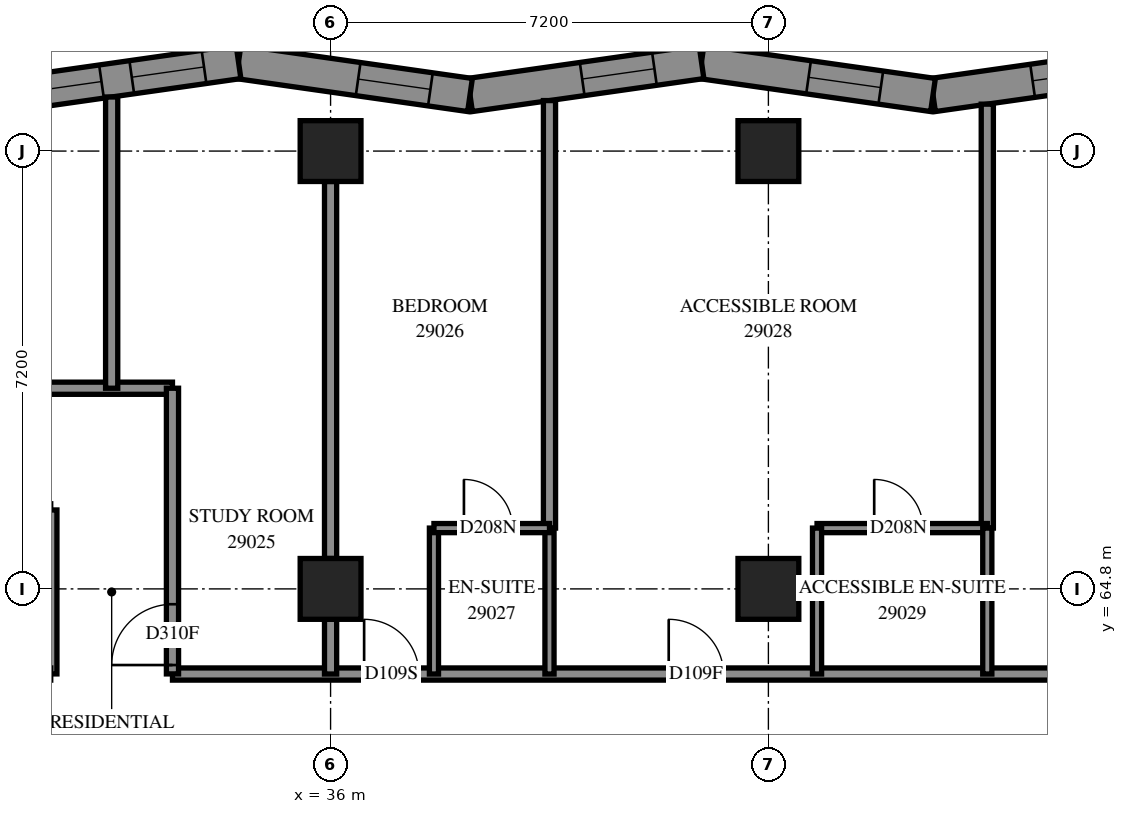
"""IFC4 building model, lengths in metres.
Left out: names, types, materials, properties, quantities, classifications, styles, units other than length and angle.
Written with IfcOpenShell. Run it as: python <this file> out.ifc"""

import sys

from ifc_helpers import new_model, si_unit, direction, frame, frame_2d, origin, origin_2d, place, context, subcontext, project, spatial, polyline, rectangle, outline, extrude, element, fill, save


model = new_model("IFC4")
c1 = context("Model", 3, precision=1e-05, world=origin(), true_north=direction((0.0, 1.0)))
c2 = subcontext(c1, "Body", "Model", "MODEL_VIEW")
j1 = project(units=[si_unit("LENGTHUNIT", "METRE"), si_unit("PLANEANGLEUNIT", "RADIAN")], contexts=[c1])
p1 = place(None, origin())
s1 = spatial("IfcSite", under=j1, at=p1, CompositionType="ELEMENT")
p2 = place(p1, origin())
s2 = spatial("IfcBuilding", under=s1, at=p2, CompositionType="ELEMENT")
p3 = place(p2, frame((0.0, 0.0, 108.4)))
s3 = spatial("IfcBuildingStorey", under=s2, at=p3, CompositionType="ELEMENT", Elevation=108.4)
for number, where, z_axis, x_axis in (
    (1, (36.0, 64.8, 0.0), (0.0, 0.0, 1.0), (1.0, 0.0, 0.0)),
    (2, (36.0, 72.0, 0.0), (0.0, 0.0, 1.0), (1.0, 0.0, 0.0)),
    (3, (43.2, 64.8, 0.0), (0.0, 0.0, 1.0), (1.0, 0.0, 0.0)),
    (4, (43.2, 72.0, 0.0), (0.0, 0.0, 1.0), (1.0, 0.0, 0.0)),
):
    element("IfcColumn", number, at=place(p3, frame(where, z_axis=z_axis, x_axis=x_axis)), inside=s3, PredefinedType="COLUMN", context=c2, shape_type="SweptSolid", body=[
        extrude(rectangle(XDim=1.0, YDim=1.0, at=origin_2d()), origin(), (0.0, 0.0, 1.0), 3.1),
    ])
p4 = place(p3, frame((49.714, 73.464, 0.0), z_axis=(0.0, 0.0, 1.0), x_axis=(-0.990016994, -0.1409480459, 0.0)))
e5 = element("IfcWall", 5, at=p4, inside=s3, PredefinedType="SOLIDWALL", context=c2, shape_type="SweptSolid", body=[
    extrude(outline(polyline([(-0.039, -0.275), (3.806, -0.275), (3.885, 0.275), (0.039, 0.275), (-0.039, -0.275)])), origin(), (0.0, 0.0, 1.0), 3.1),
])
p5 = place(p4, frame((0.991, 0.0, 0.5)))
e6 = element("IfcOpeningElement", 6, at=p5, cuts=e5, PredefinedType="OPENING", context=c2, shape_type="SweptSolid", body=[
    extrude(rectangle(XDim=1.2, YDim=2.45, at=frame_2d((0.6, 1.225))), frame((0.0, 0.285, 0.0), z_axis=(0.0, -1.0, 0.0), x_axis=(1.0, 0.0, 0.0)), (0.0, 0.0, 1.0), 0.57),
])
p6 = place(p3, frame((45.907, 72.922, 0.0), z_axis=(0.0, 0.0, 1.0), x_axis=(-0.9900175106, 0.1409444172, 0.0)))
e7 = element("IfcWall", 7, at=p6, inside=s3, PredefinedType="SOLIDWALL", context=c2, shape_type="SweptSolid", body=[
    extrude(outline(polyline([(0.039, -0.275), (3.885, -0.275), (3.806, 0.275), (-0.039, 0.275), (0.039, -0.275)])), origin(), (0.0, 0.0, 1.0), 3.1),
])
p7 = place(p6, frame((0.867, 0.0, 0.5)))
e8 = element("IfcOpeningElement", 8, at=p7, cuts=e7, PredefinedType="OPENING", context=c2, shape_type="SweptSolid", body=[
    extrude(rectangle(XDim=1.2, YDim=2.45, at=frame_2d((0.6, 1.225))), frame((0.0, 0.285, 0.0), z_axis=(0.0, -1.0, 0.0), x_axis=(1.0, 0.0, 0.0)), (0.0, 0.0, 1.0), 0.57),
])
p8 = place(p3, frame((42.1, 73.464, 0.0), z_axis=(0.0, 0.0, 1.0), x_axis=(-0.990016994, -0.1409480459, 0.0)))
e9 = element("IfcWall", 9, at=p8, inside=s3, PredefinedType="SOLIDWALL", context=c2, shape_type="SweptSolid", body=[
    extrude(outline(polyline([(-0.039, -0.275), (3.806, -0.275), (3.885, 0.275), (0.039, 0.275), (-0.039, -0.275)])), origin(), (0.0, 0.0, 1.0), 3.1),
])
p9 = place(p8, frame((0.782, 0.0, 0.5)))
e10 = element("IfcOpeningElement", 10, at=p9, cuts=e9, PredefinedType="OPENING", context=c2, shape_type="SweptSolid", body=[
    extrude(rectangle(XDim=1.2, YDim=2.45, at=frame_2d((0.6, 1.225))), frame((0.0, 0.285, 0.0), z_axis=(0.0, -1.0, 0.0), x_axis=(1.0, 0.0, 0.0)), (0.0, 0.0, 1.0), 0.57),
])
p10 = place(p3, frame((38.293, 72.922, 0.0), z_axis=(0.0, 0.0, 1.0), x_axis=(-0.990016994, 0.1409480459, 0.0)))
e11 = element("IfcWall", 11, at=p10, inside=s3, PredefinedType="SOLIDWALL", context=c2, shape_type="SweptSolid", body=[
    extrude(outline(polyline([(0.039, -0.275), (3.885, -0.275), (3.806, 0.275), (-0.039, 0.275), (0.039, -0.275)])), origin(), (0.0, 0.0, 1.0), 3.1),
])
p11 = place(p10, frame((0.658, 0.0, 0.5)))
e12 = element("IfcOpeningElement", 12, at=p11, cuts=e11, PredefinedType="OPENING", context=c2, shape_type="SweptSolid", body=[
    extrude(rectangle(XDim=1.2, YDim=2.45, at=frame_2d((0.6, 1.225))), frame((0.0, 0.285, 0.0), z_axis=(0.0, -1.0, 0.0), x_axis=(1.0, 0.0, 0.0)), (0.0, 0.0, 1.0), 0.57),
])
p12 = place(p3, frame((34.486, 73.464, 0.0), z_axis=(0.0, 0.0, 1.0), x_axis=(-0.990016994, -0.1409480459, 0.0)))
e13 = element("IfcWall", 13, at=p12, inside=s3, PredefinedType="SOLIDWALL", context=c2, shape_type="SweptSolid", body=[
    extrude(outline(polyline([(-0.039, -0.275), (3.806, -0.275), (3.885, 0.275), (0.039, 0.275), (-0.039, -0.275)])), origin(), (0.0, 0.0, 1.0), 3.1),
])
p13 = place(p12, frame((0.573, 0.0, 0.5)))
e14 = element("IfcOpeningElement", 14, at=p13, cuts=e13, PredefinedType="OPENING", context=c2, shape_type="SweptSolid", body=[
    extrude(rectangle(XDim=1.2, YDim=2.45, at=frame_2d((0.6, 1.225))), frame((0.0, 0.285, 0.0), z_axis=(0.0, -1.0, 0.0), x_axis=(1.0, 0.0, 0.0)), (0.0, 0.0, 1.0), 0.57),
])
p14 = place(p12, frame((2.276, 0.0, 0.5)))
e15 = element("IfcOpeningElement", 15, at=p14, cuts=e13, PredefinedType="OPENING", context=c2, shape_type="SweptSolid", body=[
    extrude(rectangle(XDim=1.2, YDim=2.45, at=frame_2d((0.6, 1.225))), frame((0.0, 0.285, 0.0), z_axis=(0.0, -1.0, 0.0), x_axis=(1.0, 0.0, 0.0)), (0.0, 0.0, 1.0), 0.57),
])
p15 = place(p3, frame((33.4, 63.4, 0.0), z_axis=(0.0, 0.0, 1.0), x_axis=(1.0, 0.0, 0.0)))
e16 = element("IfcWall", 16, at=p15, inside=s3, PredefinedType="PARTITIONING", context=c2, shape_type="SweptSolid", body=[
    extrude(rectangle(XDim=21.9, YDim=0.2, at=frame_2d((10.95, 0.0))), origin(), (0.0, 0.0, 1.0), 3.1),
])
p16 = place(p15, frame((3.152, 0.0, 0.0)))
e17 = element("IfcOpeningElement", 17, at=p16, cuts=e16, PredefinedType="OPENING", context=c2, shape_type="SweptSolid", body=[
    extrude(rectangle(XDim=0.9, YDim=2.1, at=frame_2d((0.45, 1.05))), frame((0.0, 0.11, 0.0), z_axis=(0.0, -1.0, 0.0), x_axis=(1.0, 0.0, 0.0)), (0.0, 0.0, 1.0), 0.22),
])
p17 = place(p15, frame((8.161, 0.0, 0.0)))
e18 = element("IfcOpeningElement", 18, at=p17, cuts=e16, PredefinedType="OPENING", context=c2, shape_type="SweptSolid", body=[
    extrude(rectangle(XDim=0.9, YDim=2.1, at=frame_2d((0.45, 1.05))), frame((0.0, 0.11, 0.0), z_axis=(0.0, -1.0, 0.0), x_axis=(1.0, 0.0, 0.0)), (0.0, 0.0, 1.0), 0.22),
])
p18 = place(p15, frame((15.471, 0.0, 0.0)))
e19 = element("IfcOpeningElement", 19, at=p18, cuts=e16, PredefinedType="OPENING", context=c2, shape_type="SweptSolid", body=[
    extrude(rectangle(XDim=1.0, YDim=2.1, at=frame_2d((0.5, 1.05))), frame((0.0, 0.11, 0.0), z_axis=(0.0, -1.0, 0.0), x_axis=(1.0, 0.0, 0.0)), (0.0, 0.0, 1.0), 0.22),
])
p19 = place(p3, frame((21.602, 68.1, 0.0), z_axis=(0.0, 0.0, 1.0), x_axis=(1.0, 0.0, 0.0)))
e20 = element("IfcWall", 20, at=p19, inside=s3, PredefinedType="PARTITIONING", context=c2, shape_type="SweptSolid", body=[
    extrude(rectangle(XDim=11.798, YDim=0.2, at=frame_2d((5.899, 0.0))), origin(), (0.0, 0.0, 1.0), 3.1),
])
p20 = place(p19, frame((5.972, 0.0, 0.0)))
e21 = element("IfcOpeningElement", 21, at=p20, cuts=e20, PredefinedType="OPENING", context=c2, shape_type="SweptSolid", body=[
    extrude(rectangle(XDim=1.0, YDim=2.1, at=frame_2d((0.5, 1.05))), frame((0.0, 0.11, 0.0), z_axis=(0.0, -1.0, 0.0), x_axis=(1.0, 0.0, 0.0)), (0.0, 0.0, 1.0), 0.22),
])
p21 = place(p3, frame((39.6, 65.8, 0.0), z_axis=(0.0, 0.0, 1.0), x_axis=(0.0, 1.0, 0.0)))
e22 = element("IfcWall", 22, at=p21, inside=s3, PredefinedType="PARTITIONING", context=c2, shape_type="SweptSolid", body=[
    extrude(rectangle(XDim=7.03, YDim=0.2, at=frame_2d((3.515, 0.0))), origin(), (0.0, 0.0, 1.0), 3.1),
])
p22 = place(p3, frame((46.8, 65.8, 0.0), z_axis=(0.0, 0.0, 1.0), x_axis=(0.0, 1.0, 0.0)))
e23 = element("IfcWall", 23, at=p22, inside=s3, PredefinedType="PARTITIONING", context=c2, shape_type="SweptSolid", body=[
    extrude(rectangle(XDim=6.972, YDim=0.2, at=frame_2d((3.486, 0.0))), origin(), (0.0, 0.0, 1.0), 3.1),
])
p23 = place(p3, frame((36.0, 65.3, 0.0), z_axis=(0.0, 0.0, 1.0), x_axis=(0.0, 1.0, 0.0)))
e24 = element("IfcWall", 24, at=p23, inside=s3, PredefinedType="PARTITIONING", context=c2, shape_type="SweptSolid", body=[
    extrude(rectangle(XDim=6.2, YDim=0.2, at=frame_2d((3.1, 0.0))), origin(), (0.0, 0.0, 1.0), 3.1),
])
p24 = place(p3, frame((32.4, 68.1, 0.0), z_axis=(0.0, 0.0, 1.0), x_axis=(0.0, 1.0, 0.0)))
e25 = element("IfcWall", 25, at=p24, inside=s3, PredefinedType="PARTITIONING", context=c2, shape_type="SweptSolid", body=[
    extrude(rectangle(XDim=4.79, YDim=0.2, at=frame_2d((2.395, 0.0))), origin(), (0.0, 0.0, 1.0), 3.1),
])
p25 = place(p3, frame((33.4, 63.402, 0.0), z_axis=(0.0, 0.0, 1.0), x_axis=(0.0, 1.0, 0.0)))
e26 = element("IfcWall", 26, at=p25, inside=s3, PredefinedType="PARTITIONING", context=c2, shape_type="SweptSolid", body=[
    extrude(rectangle(XDim=4.698, YDim=0.2, at=frame_2d((2.349, 0.0))), origin(), (0.0, 0.0, 1.0), 3.1),
])
p26 = place(p25, frame((0.146, 0.0, 0.0)))
e27 = element("IfcOpeningElement", 27, at=p26, cuts=e26, PredefinedType="OPENING", context=c2, shape_type="SweptSolid", body=[
    extrude(rectangle(XDim=1.0, YDim=2.1, at=frame_2d((0.5, 1.05))), frame((0.0, 0.11, 0.0), z_axis=(0.0, -1.0, 0.0), x_axis=(1.0, 0.0, 0.0)), (0.0, 0.0, 1.0), 0.22),
])
p27 = place(p3, frame((44.0, 65.8, 0.0), z_axis=(0.0, 0.0, 1.0), x_axis=(1.0, 0.0, 0.0)))
e28 = element("IfcWall", 28, at=p27, inside=s3, PredefinedType="PARTITIONING", context=c2, shape_type="SweptSolid", body=[
    extrude(rectangle(XDim=2.8, YDim=0.15, at=frame_2d((1.4, 0.0))), origin(), (0.0, 0.0, 1.0), 3.1),
])
p28 = place(p27, frame((0.94, 0.0, 0.0)))
e29 = element("IfcOpeningElement", 29, at=p28, cuts=e28, PredefinedType="OPENING", context=c2, shape_type="SweptSolid", body=[
    extrude(rectangle(XDim=0.8, YDim=2.1, at=frame_2d((0.4, 1.05))), frame((0.0, 0.085, 0.0), z_axis=(0.0, -1.0, 0.0), x_axis=(1.0, 0.0, 0.0)), (0.0, 0.0, 1.0), 0.17),
])
p29 = place(p3, frame((31.4, 63.402, 0.0), z_axis=(0.0, 0.0, 1.0), x_axis=(0.0, 1.0, 0.0)))
e30 = element("IfcWall", 30, at=p29, inside=s3, PredefinedType="PARTITIONING", context=c2, shape_type="SweptSolid", body=[
    extrude(rectangle(XDim=2.696, YDim=0.2, at=frame_2d((1.348, 0.0))), origin(), (0.0, 0.0, 1.0), 3.1),
])
for number, where, z_axis, x_axis in (
    (31, (37.7, 63.4, 0.0), (0.0, 0.0, 1.0), (0.0, 1.0, 0.0)),
    (32, (39.6, 63.4, 0.0), (0.0, 0.0, 1.0), (0.0, 1.0, 0.0)),
    (33, (44.0, 63.4, 0.0), (0.0, 0.0, 1.0), (0.0, 1.0, 0.0)),
    (34, (46.8, 63.4, 0.0), (0.0, 0.0, 1.0), (0.0, 1.0, 0.0)),
):
    element("IfcWall", number, at=place(p3, frame(where, z_axis=z_axis, x_axis=x_axis)), inside=s3, PredefinedType="PARTITIONING", context=c2, shape_type="SweptSolid", body=[
        extrude(rectangle(XDim=2.4, YDim=0.15, at=frame_2d((1.2, 0.0))), origin(), (0.0, 0.0, 1.0), 3.1),
    ])
p30 = place(p3, frame((37.7, 65.8, 0.0), z_axis=(0.0, 0.0, 1.0), x_axis=(1.0, 0.0, 0.0)))
e35 = element("IfcWall", 35, at=p30, inside=s3, PredefinedType="PARTITIONING", context=c2, shape_type="SweptSolid", body=[
    extrude(rectangle(XDim=1.9, YDim=0.15, at=frame_2d((0.95, 0.0))), origin(), (0.0, 0.0, 1.0), 3.1),
])
p31 = place(p30, frame((0.493, 0.0, 0.0)))
e36 = element("IfcOpeningElement", 36, at=p31, cuts=e35, PredefinedType="OPENING", context=c2, shape_type="SweptSolid", body=[
    extrude(rectangle(XDim=0.8, YDim=2.1, at=frame_2d((0.4, 1.05))), frame((0.0, 0.085, 0.0), z_axis=(0.0, -1.0, 0.0), x_axis=(1.0, 0.0, 0.0)), (0.0, 0.0, 1.0), 0.17),
])
p32 = place(p3, frame((36.0, 63.4, 0.0), z_axis=(0.0, 0.0, 1.0), x_axis=(0.0, 1.0, 0.0)))
e37 = element("IfcWall", 37, at=p32, inside=s3, PredefinedType="PARTITIONING", context=c2, shape_type="SweptSolid", body=[
    extrude(rectangle(XDim=0.9, YDim=0.2, at=frame_2d((0.45, 0.0))), origin(), (0.0, 0.0, 1.0), 3.1),
])
p33 = place(p5, origin())
e38 = element("IfcWindow", 38, at=p33, inside=s3, PartitioningType="SINGLE_PANEL", PredefinedType="WINDOW", context=c2, shape_type="SweptSolid", body=[
    extrude(rectangle(XDim=1.2, YDim=2.45, at=frame_2d((0.6, 1.225))), frame((0.0, 0.155, 0.0), z_axis=(0.0, -1.0, 0.0), x_axis=(1.0, 0.0, 0.0)), (0.0, 0.0, 1.0), 0.06),
])
fill(e6, e38)
p34 = place(p7, origin())
e39 = element("IfcWindow", 39, at=p34, inside=s3, PartitioningType="SINGLE_PANEL", PredefinedType="WINDOW", context=c2, shape_type="SweptSolid", body=[
    extrude(rectangle(XDim=1.2, YDim=2.45, at=frame_2d((0.6, 1.225))), frame((0.0, 0.155, 0.0), z_axis=(0.0, -1.0, 0.0), x_axis=(1.0, 0.0, 0.0)), (0.0, 0.0, 1.0), 0.06),
])
fill(e8, e39)
p35 = place(p9, origin())
e40 = element("IfcWindow", 40, at=p35, inside=s3, PartitioningType="SINGLE_PANEL", PredefinedType="WINDOW", context=c2, shape_type="SweptSolid", body=[
    extrude(rectangle(XDim=1.2, YDim=2.45, at=frame_2d((0.6, 1.225))), frame((0.0, 0.155, 0.0), z_axis=(0.0, -1.0, 0.0), x_axis=(1.0, 0.0, 0.0)), (0.0, 0.0, 1.0), 0.06),
])
fill(e10, e40)
p36 = place(p11, origin())
e41 = element("IfcWindow", 41, at=p36, inside=s3, PartitioningType="SINGLE_PANEL", PredefinedType="WINDOW", context=c2, shape_type="SweptSolid", body=[
    extrude(rectangle(XDim=1.2, YDim=2.45, at=frame_2d((0.6, 1.225))), frame((0.0, 0.155, 0.0), z_axis=(0.0, -1.0, 0.0), x_axis=(1.0, 0.0, 0.0)), (0.0, 0.0, 1.0), 0.06),
])
fill(e12, e41)
p37 = place(p13, origin())
e42 = element("IfcWindow", 42, at=p37, inside=s3, PartitioningType="SINGLE_PANEL", PredefinedType="WINDOW", context=c2, shape_type="SweptSolid", body=[
    extrude(rectangle(XDim=1.2, YDim=2.45, at=frame_2d((0.6, 1.225))), frame((0.0, 0.155, 0.0), z_axis=(0.0, -1.0, 0.0), x_axis=(1.0, 0.0, 0.0)), (0.0, 0.0, 1.0), 0.06),
])
fill(e14, e42)
p38 = place(p14, origin())
e43 = element("IfcWindow", 43, at=p38, inside=s3, PartitioningType="SINGLE_PANEL", PredefinedType="WINDOW", context=c2, shape_type="SweptSolid", body=[
    extrude(rectangle(XDim=1.2, YDim=2.45, at=frame_2d((0.6, 1.225))), frame((0.0, 0.155, 0.0), z_axis=(0.0, -1.0, 0.0), x_axis=(1.0, 0.0, 0.0)), (0.0, 0.0, 1.0), 0.06),
])
fill(e15, e43)
p39 = place(p26, origin())
e44 = element("IfcDoor", 44, at=p39, inside=s3, OperationType="SINGLE_SWING_LEFT", PredefinedType="DOOR", context=c2, shape_type="SweptSolid", body=[
    extrude(rectangle(XDim=1.0, YDim=2.1, at=frame_2d((0.5, 1.05))), frame((0.0, 0.025, 0.0), z_axis=(0.0, -1.0, 0.0), x_axis=(1.0, 0.0, 0.0)), (0.0, 0.0, 1.0), 0.05),
])
fill(e27, e44)
p40 = place(p16, origin())
e45 = element("IfcDoor", 45, at=p40, inside=s3, OperationType="SINGLE_SWING_RIGHT", PredefinedType="DOOR", context=c2, shape_type="SweptSolid", body=[
    extrude(rectangle(XDim=0.9, YDim=2.1, at=frame_2d((0.45, 1.05))), frame((0.0, 0.025, 0.0), z_axis=(0.0, -1.0, 0.0), x_axis=(1.0, 0.0, 0.0)), (0.0, 0.0, 1.0), 0.05),
])
fill(e17, e45)
p41 = place(p31, origin())
e46 = element("IfcDoor", 46, at=p41, inside=s3, OperationType="SINGLE_SWING_RIGHT", PredefinedType="DOOR", context=c2, shape_type="SweptSolid", body=[
    extrude(rectangle(XDim=0.8, YDim=2.1, at=frame_2d((0.4, 1.05))), frame((0.0, 0.025, 0.0), z_axis=(0.0, -1.0, 0.0), x_axis=(1.0, 0.0, 0.0)), (0.0, 0.0, 1.0), 0.05),
])
fill(e36, e46)
p42 = place(p17, origin())
e47 = element("IfcDoor", 47, at=p42, inside=s3, OperationType="SINGLE_SWING_LEFT", PredefinedType="DOOR", context=c2, shape_type="SweptSolid", body=[
    extrude(rectangle(XDim=0.9, YDim=2.1, at=frame_2d((0.45, 1.05))), frame((0.0, 0.025, 0.0), z_axis=(0.0, -1.0, 0.0), x_axis=(1.0, 0.0, 0.0)), (0.0, 0.0, 1.0), 0.05),
])
fill(e18, e47)
p43 = place(p28, origin())
e48 = element("IfcDoor", 48, at=p43, inside=s3, OperationType="SINGLE_SWING_RIGHT", PredefinedType="DOOR", context=c2, shape_type="SweptSolid", body=[
    extrude(rectangle(XDim=0.8, YDim=2.1, at=frame_2d((0.4, 1.05))), frame((0.0, 0.025, 0.0), z_axis=(0.0, -1.0, 0.0), x_axis=(1.0, 0.0, 0.0)), (0.0, 0.0, 1.0), 0.05),
])
fill(e29, e48)
save(model, sys.argv[1])
